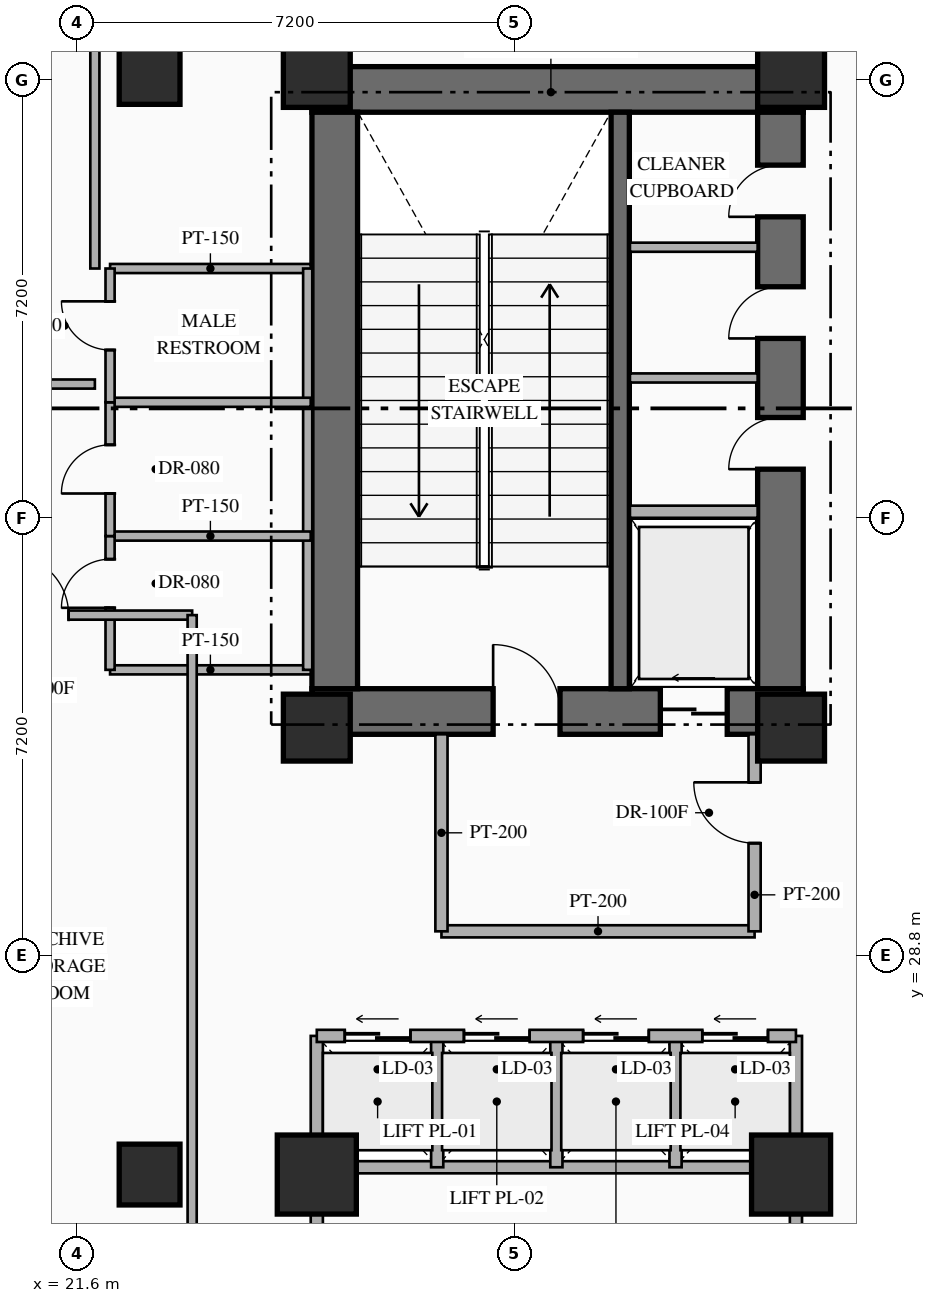
"""IFC4 building model, lengths in metres.
Left out: names, types, materials, properties, quantities, classifications, styles, units other than length and angle.
Written with IfcOpenShell. Run it as: python <this file> out.ifc"""

import sys

from ifc_helpers import new_model, si_unit, direction, frame, frame_2d, origin, origin_2d, place, context, subcontext, project, spatial, rectangle, hollow_rectangle, extrude, element, fill, save


model = new_model("IFC4")
c1 = context("Model", 3, precision=1e-05, world=origin(), true_north=direction((0.0, 1.0)))
c2 = subcontext(c1, "Body", "Model", "MODEL_VIEW")
j1 = project(units=[si_unit("LENGTHUNIT", "METRE"), si_unit("PLANEANGLEUNIT", "RADIAN")], contexts=[c1])
p1 = place(None, origin())
s1 = spatial("IfcSite", under=j1, at=p1, CompositionType="ELEMENT")
p2 = place(p1, origin())
s2 = spatial("IfcBuilding", under=s1, at=p2, CompositionType="ELEMENT")
p3 = place(p2, frame((0.0, 0.0, 10.8)))
s3 = spatial("IfcBuildingStorey", under=s2, at=p3, CompositionType="ELEMENT", Elevation=10.8)
p4 = place(p3, frame((25.47, 32.815, 0.0), z_axis=(0.0, 0.0, 1.0), x_axis=(1.0, 0.0, 0.0)))
e1 = element("IfcWall", 1, at=p4, inside=s3, PredefinedType="SHEAR", context=c2, shape_type="SweptSolid", body=[
    extrude(rectangle(XDim=8.08, YDim=0.75, at=frame_2d((4.04, 0.0))), origin(), (0.0, 0.0, 1.0), 5.4),
])
p5 = place(p4, frame((2.98, 0.0, 0.0)))
e2 = element("IfcOpeningElement", 2, at=p5, cuts=e1, PredefinedType="OPENING", context=c2, shape_type="SweptSolid", body=[
    extrude(rectangle(XDim=1.1, YDim=2.2, at=frame_2d((0.55, 1.1))), frame((0.0, 0.385, 0.0), z_axis=(0.0, -1.0, 0.0), x_axis=(1.0, 0.0, 0.0)), (0.0, 0.0, 1.0), 0.77),
])
p6 = place(p4, frame((5.73, 0.0, 0.0)))
e3 = element("IfcOpeningElement", 3, at=p6, cuts=e1, PredefinedType="OPENING", context=c2, shape_type="SweptSolid", body=[
    extrude(rectangle(XDim=1.1, YDim=2.15, at=frame_2d((0.55, 1.075))), frame((0.0, 0.385, 0.0), z_axis=(0.0, -1.0, 0.0), x_axis=(1.0, 0.0, 0.0)), (0.0, 0.0, 1.0), 0.77),
])
p7 = place(p3, frame((25.47, 43.045, 0.0), z_axis=(0.0, 0.0, 1.0), x_axis=(1.0, 0.0, 0.0)))
e4 = element("IfcWall", 4, at=p7, inside=s3, PredefinedType="SHEAR", context=c2, shape_type="SweptSolid", body=[
    extrude(rectangle(XDim=8.08, YDim=0.75, at=frame_2d((4.04, 0.0))), origin(), (0.0, 0.0, 1.0), 5.4),
])
p8 = place(p3, frame((25.845, 33.19, 0.0), z_axis=(0.0, 0.0, 1.0), x_axis=(0.0, 1.0, 0.0)))
e5 = element("IfcWall", 5, at=p8, inside=s3, PredefinedType="SHEAR", context=c2, shape_type="SweptSolid", body=[
    extrude(rectangle(XDim=9.48, YDim=0.75, at=frame_2d((4.74, 0.0))), origin(), (0.0, 0.0, 1.0), 5.4),
])
p9 = place(p3, frame((33.175, 33.19, 0.0), z_axis=(0.0, 0.0, 1.0), x_axis=(0.0, 1.0, 0.0)))
e6 = element("IfcWall", 6, at=p9, inside=s3, PredefinedType="SHEAR", context=c2, shape_type="SweptSolid", body=[
    extrude(rectangle(XDim=9.48, YDim=0.75, at=frame_2d((4.74, 0.0))), origin(), (0.0, 0.0, 1.0), 5.4),
])
p10 = place(p9, frame((3.61, 0.0, 0.0)))
e7 = element("IfcOpeningElement", 7, at=p10, cuts=e6, PredefinedType="OPENING", context=c2, shape_type="SweptSolid", body=[
    extrude(rectangle(XDim=0.85, YDim=2.08, at=frame_2d((0.425, 1.04))), frame((0.0, 0.385, 0.0), z_axis=(0.0, -1.0, 0.0), x_axis=(1.0, 0.0, 0.0)), (0.0, 0.0, 1.0), 0.77),
])
p11 = place(p9, frame((5.76, 0.0, 0.0)))
e8 = element("IfcOpeningElement", 8, at=p11, cuts=e6, PredefinedType="OPENING", context=c2, shape_type="SweptSolid", body=[
    extrude(rectangle(XDim=0.85, YDim=2.08, at=frame_2d((0.425, 1.04))), frame((0.0, 0.385, 0.0), z_axis=(0.0, -1.0, 0.0), x_axis=(1.0, 0.0, 0.0)), (0.0, 0.0, 1.0), 0.77),
])
p12 = place(p9, frame((7.76, 0.0, 0.0)))
e9 = element("IfcOpeningElement", 9, at=p12, cuts=e6, PredefinedType="OPENING", context=c2, shape_type="SweptSolid", body=[
    extrude(rectangle(XDim=0.85, YDim=2.08, at=frame_2d((0.425, 1.04))), frame((0.0, 0.385, 0.0), z_axis=(0.0, -1.0, 0.0), x_axis=(1.0, 0.0, 0.0)), (0.0, 0.0, 1.0), 0.77),
])
p13 = place(p3, frame((30.54, 33.19, 0.0), z_axis=(0.0, 0.0, 1.0), x_axis=(0.0, 1.0, 0.0)))
e10 = element("IfcWall", 10, at=p13, inside=s3, PredefinedType="SHEAR", context=c2, shape_type="SweptSolid", body=[
    extrude(rectangle(XDim=9.48, YDim=0.3, at=frame_2d((4.74, 0.0))), origin(), (0.0, 0.0, 1.0), 5.4),
])
for number, where, z_axis, x_axis in (
    (11, (25.55, 32.55, 0.0), (0.0, 0.0, 1.0), (1.0, 0.0, 0.0)),
    (12, (33.35, 32.55, 0.0), (0.0, 0.0, 1.0), (1.0, 0.0, 0.0)),
    (13, (25.55, 43.3, 0.0), (0.0, 0.0, 1.0), (1.0, 0.0, 0.0)),
    (14, (33.35, 43.3, 0.0), (0.0, 0.0, 1.0), (1.0, 0.0, 0.0)),
):
    element("IfcColumn", number, at=place(p3, frame(where, z_axis=z_axis, x_axis=x_axis)), inside=s3, PredefinedType="COLUMN", context=c2, shape_type="SweptSolid", body=[
        extrude(rectangle(XDim=1.1, YDim=1.1, at=origin_2d()), origin(), (0.0, 0.0, 1.0), 5.4),
    ])
for number, where, z_axis, x_axis in (
    (15, (25.55, 25.2, 0.0), (0.0, 0.0, 1.0), (1.0, 0.0, 0.0)),
    (16, (33.35, 25.2, 0.0), (0.0, 0.0, 1.0), (1.0, 0.0, 0.0)),
):
    element("IfcColumn", number, at=place(p3, frame(where, z_axis=z_axis, x_axis=x_axis)), inside=s3, PredefinedType="COLUMN", context=c2, shape_type="SweptSolid", body=[
        extrude(rectangle(XDim=1.3, YDim=1.3, at=origin_2d()), origin(), (0.0, 0.0, 1.0), 5.4),
    ])
for number, where, z_axis, x_axis in (
    (17, (22.8, 25.2, 0.0), (0.0, 0.0, 1.0), (1.0, 0.0, 0.0)),
    (18, (22.8, 43.3, 0.0), (0.0, 0.0, 1.0), (1.0, 0.0, 0.0)),
):
    element("IfcColumn", number, at=place(p3, frame(where, z_axis=z_axis, x_axis=x_axis)), inside=s3, PredefinedType="COLUMN", context=c2, shape_type="SweptSolid", body=[
        extrude(hollow_rectangle(XDim=1.0, YDim=1.0, WallThickness=0.038, at=origin_2d()), origin(), (0.0, 0.0, 1.0), 5.4),
    ])
p14 = place(p3, frame((30.7, 36.1, 0.0), z_axis=(0.0, 0.0, 1.0), x_axis=(1.0, 0.0, 0.0)))
e19 = element("IfcWall", 19, at=p14, inside=s3, PredefinedType="STANDARD", context=c2, shape_type="SweptSolid", body=[
    extrude(rectangle(XDim=2.1, YDim=0.2, at=frame_2d((1.05, 0.0))), origin(), (0.0, 0.0, 1.0), 5.1),
])
for number, where, z_axis, x_axis in (
    (20, (30.7, 38.3, 0.0), (0.0, 0.0, 1.0), (1.0, 0.0, 0.0)),
    (21, (30.7, 40.45, 0.0), (0.0, 0.0, 1.0), (1.0, 0.0, 0.0)),
):
    element("IfcWall", number, at=place(p3, frame(where, z_axis=z_axis, x_axis=x_axis)), inside=s3, PredefinedType="PARTITIONING", context=c2, shape_type="SweptSolid", body=[
        extrude(rectangle(XDim=2.1, YDim=0.15, at=frame_2d((1.05, 0.0))), origin(), (0.0, 0.0, 1.0), 5.1),
    ])
p15 = place(p3, frame((27.6, 29.2, 0.0), z_axis=(0.0, 0.0, 1.0), x_axis=(1.0, 0.0, 0.0)))
e22 = element("IfcWall", 22, at=p15, inside=s3, PredefinedType="STANDARD", context=c2, shape_type="SweptSolid", body=[
    extrude(rectangle(XDim=5.15, YDim=0.2, at=frame_2d((2.575, 0.0))), origin(), (0.0, 0.0, 1.0), 5.1),
])
p16 = place(p3, frame((27.6, 29.2, 0.0), z_axis=(0.0, 0.0, 1.0), x_axis=(0.0, 1.0, 0.0)))
e23 = element("IfcWall", 23, at=p16, inside=s3, PredefinedType="STANDARD", context=c2, shape_type="SweptSolid", body=[
    extrude(rectangle(XDim=3.24, YDim=0.2, at=frame_2d((1.62, 0.0))), origin(), (0.0, 0.0, 1.0), 5.1),
])
p17 = place(p3, frame((32.75, 29.2, 0.0), z_axis=(0.0, 0.0, 1.0), x_axis=(0.0, 1.0, 0.0)))
e24 = element("IfcWall", 24, at=p17, inside=s3, PredefinedType="STANDARD", context=c2, shape_type="SweptSolid", body=[
    extrude(rectangle(XDim=3.24, YDim=0.2, at=frame_2d((1.62, 0.0))), origin(), (0.0, 0.0, 1.0), 5.1),
])
p18 = place(p17, frame((1.45, 0.0, 0.0)))
e25 = element("IfcOpeningElement", 25, at=p18, cuts=e24, PredefinedType="OPENING", context=c2, shape_type="SweptSolid", body=[
    extrude(rectangle(XDim=1.0, YDim=2.2, at=frame_2d((0.5, 1.1))), frame((0.0, 0.11, 0.0), z_axis=(0.0, -1.0, 0.0), x_axis=(1.0, 0.0, 0.0)), (0.0, 0.0, 1.0), 0.22),
])
for number, where, z_axis, x_axis in (
    (26, (25.55, 23.4, 0.0), (0.0, 0.0, 1.0), (0.0, 1.0, 0.0)),
    (27, (33.43, 23.4, 0.0), (0.0, 0.0, 1.0), (0.0, 1.0, 0.0)),
):
    element("IfcWall", number, at=place(p3, frame(where, z_axis=z_axis, x_axis=x_axis)), inside=s3, PredefinedType="STANDARD", context=c2, shape_type="SweptSolid", body=[
        extrude(rectangle(XDim=4.08, YDim=0.2, at=frame_2d((2.04, 0.0))), origin(), (0.0, 0.0, 1.0), 3.895),
    ])
p19 = place(p3, frame((25.55, 25.32, 0.0), z_axis=(0.0, 0.0, 1.0), x_axis=(1.0, 0.0, 0.0)))
e28 = element("IfcWall", 28, at=p19, inside=s3, PredefinedType="STANDARD", context=c2, shape_type="SweptSolid", body=[
    extrude(rectangle(XDim=7.88, YDim=0.2, at=frame_2d((3.94, 0.0))), origin(), (0.0, 0.0, 1.0), 4.495),
])
for number, where, z_axis, x_axis in (
    (29, (27.53, 25.32, 0.0), (0.0, 0.0, 1.0), (0.0, 1.0, 0.0)),
    (30, (29.49, 25.32, 0.0), (0.0, 0.0, 1.0), (0.0, 1.0, 0.0)),
    (31, (31.45, 25.32, 0.0), (0.0, 0.0, 1.0), (0.0, 1.0, 0.0)),
):
    element("IfcWall", number, at=place(p3, frame(where, z_axis=z_axis, x_axis=x_axis)), inside=s3, PredefinedType="STANDARD", context=c2, shape_type="SweptSolid", body=[
        extrude(rectangle(XDim=2.16, YDim=0.2, at=frame_2d((1.08, 0.0))), origin(), (0.0, 0.0, 1.0), 5.1),
    ])
p20 = place(p3, frame((25.55, 27.48, 0.0), z_axis=(0.0, 0.0, 1.0), x_axis=(1.0, 0.0, 0.0)))
e32 = element("IfcWall", 32, at=p20, inside=s3, PredefinedType="STANDARD", context=c2, shape_type="SweptSolid", body=[
    extrude(rectangle(XDim=7.88, YDim=0.2, at=frame_2d((3.94, 0.0))), origin(), (0.0, 0.0, 1.0), 5.1),
])
p21 = place(p20, frame((0.46, 0.0, 0.0)))
e33 = element("IfcOpeningElement", 33, at=p21, cuts=e32, PredefinedType="OPENING", context=c2, shape_type="SweptSolid", body=[
    extrude(rectangle(XDim=1.08, YDim=2.15, at=frame_2d((0.54, 1.075))), frame((0.0, 0.11, 0.0), z_axis=(0.0, -1.0, 0.0), x_axis=(1.0, 0.0, 0.0)), (0.0, 0.0, 1.0), 0.22),
])
p22 = place(p20, frame((2.42, 0.0, 0.0)))
e34 = element("IfcOpeningElement", 34, at=p22, cuts=e32, PredefinedType="OPENING", context=c2, shape_type="SweptSolid", body=[
    extrude(rectangle(XDim=1.08, YDim=2.15, at=frame_2d((0.54, 1.075))), frame((0.0, 0.11, 0.0), z_axis=(0.0, -1.0, 0.0), x_axis=(1.0, 0.0, 0.0)), (0.0, 0.0, 1.0), 0.22),
])
p23 = place(p20, frame((4.38, 0.0, 0.0)))
e35 = element("IfcOpeningElement", 35, at=p23, cuts=e32, PredefinedType="OPENING", context=c2, shape_type="SweptSolid", body=[
    extrude(rectangle(XDim=1.08, YDim=2.15, at=frame_2d((0.54, 1.075))), frame((0.0, 0.11, 0.0), z_axis=(0.0, -1.0, 0.0), x_axis=(1.0, 0.0, 0.0)), (0.0, 0.0, 1.0), 0.22),
])
p24 = place(p20, frame((6.34, 0.0, 0.0)))
e36 = element("IfcOpeningElement", 36, at=p24, cuts=e32, PredefinedType="OPENING", context=c2, shape_type="SweptSolid", body=[
    extrude(rectangle(XDim=1.08, YDim=2.15, at=frame_2d((0.54, 1.075))), frame((0.0, 0.11, 0.0), z_axis=(0.0, -1.0, 0.0), x_axis=(1.0, 0.0, 0.0)), (0.0, 0.0, 1.0), 0.22),
])
for number, where, z_axis, x_axis in (
    (37, (22.15, 33.5, 0.0), (0.0, 0.0, 1.0), (1.0, 0.0, 0.0)),
    (38, (22.15, 40.1, 0.0), (0.0, 0.0, 1.0), (1.0, 0.0, 0.0)),
):
    element("IfcWall", number, at=place(p3, frame(where, z_axis=z_axis, x_axis=x_axis)), inside=s3, PredefinedType="PARTITIONING", context=c2, shape_type="SweptSolid", body=[
        extrude(rectangle(XDim=3.3, YDim=0.15, at=frame_2d((1.65, 0.0))), origin(), (0.0, 0.0, 1.0), 5.1),
    ])
p25 = place(p3, frame((25.4, 33.5, 0.0), z_axis=(0.0, 0.0, 1.0), x_axis=(0.0, 1.0, 0.0)))
e39 = element("IfcWall", 39, at=p25, inside=s3, PredefinedType="PARTITIONING", context=c2, shape_type="SweptSolid", body=[
    extrude(rectangle(XDim=6.6, YDim=0.15, at=frame_2d((3.3, 0.0))), origin(), (0.0, 0.0, 1.0), 5.1),
])
for number, where, z_axis, x_axis in (
    (40, (22.15, 35.7, 0.0), (0.0, 0.0, 1.0), (1.0, 0.0, 0.0)),
    (41, (22.15, 37.9, 0.0), (0.0, 0.0, 1.0), (1.0, 0.0, 0.0)),
):
    element("IfcWall", number, at=place(p3, frame(where, z_axis=z_axis, x_axis=x_axis)), inside=s3, PredefinedType="PARTITIONING", context=c2, shape_type="SweptSolid", body=[
        extrude(rectangle(XDim=3.3, YDim=0.15, at=frame_2d((1.65, 0.0))), origin(), (0.0, 0.0, 1.0), 5.1),
    ])
p26 = place(p3, frame((22.15, 33.5, 0.0), z_axis=(0.0, 0.0, 1.0), x_axis=(0.0, 1.0, 0.0)))
e42 = element("IfcWall", 42, at=p26, inside=s3, PredefinedType="PARTITIONING", context=c2, shape_type="SweptSolid", body=[
    extrude(rectangle(XDim=2.2, YDim=0.15, at=frame_2d((1.1, 0.0))), origin(), (0.0, 0.0, 1.0), 5.1),
])
p27 = place(p26, frame((1.02, 0.0, 0.0)))
e43 = element("IfcOpeningElement", 43, at=p27, cuts=e42, PredefinedType="OPENING", context=c2, shape_type="SweptSolid", body=[
    extrude(rectangle(XDim=0.8, YDim=2.06, at=frame_2d((0.4, 1.03))), frame((0.0, 0.085, 0.0), z_axis=(0.0, -1.0, 0.0), x_axis=(1.0, 0.0, 0.0)), (0.0, 0.0, 1.0), 0.17),
])
p28 = place(p3, frame((22.15, 35.7, 0.0), z_axis=(0.0, 0.0, 1.0), x_axis=(0.0, 1.0, 0.0)))
e44 = element("IfcWall", 44, at=p28, inside=s3, PredefinedType="PARTITIONING", context=c2, shape_type="SweptSolid", body=[
    extrude(rectangle(XDim=2.2, YDim=0.15, at=frame_2d((1.1, 0.0))), origin(), (0.0, 0.0, 1.0), 5.1),
])
p29 = place(p28, frame((0.7, 0.0, 0.0)))
e45 = element("IfcOpeningElement", 45, at=p29, cuts=e44, PredefinedType="OPENING", context=c2, shape_type="SweptSolid", body=[
    extrude(rectangle(XDim=0.8, YDim=2.06, at=frame_2d((0.4, 1.03))), frame((0.0, 0.085, 0.0), z_axis=(0.0, -1.0, 0.0), x_axis=(1.0, 0.0, 0.0)), (0.0, 0.0, 1.0), 0.17),
])
p30 = place(p3, frame((22.15, 37.9, 0.0), z_axis=(0.0, 0.0, 1.0), x_axis=(0.0, 1.0, 0.0)))
e46 = element("IfcWall", 46, at=p30, inside=s3, PredefinedType="PARTITIONING", context=c2, shape_type="SweptSolid", body=[
    extrude(rectangle(XDim=2.2, YDim=0.15, at=frame_2d((1.1, 0.0))), origin(), (0.0, 0.0, 1.0), 5.1),
])
p31 = place(p30, frame((0.86, 0.0, 0.0)))
e47 = element("IfcOpeningElement", 47, at=p31, cuts=e46, PredefinedType="OPENING", context=c2, shape_type="SweptSolid", body=[
    extrude(rectangle(XDim=0.8, YDim=2.06, at=frame_2d((0.4, 1.03))), frame((0.0, 0.085, 0.0), z_axis=(0.0, -1.0, 0.0), x_axis=(1.0, 0.0, 0.0)), (0.0, 0.0, 1.0), 0.17),
])
p32 = place(p3, frame((13.6, 38.2, 0.0), z_axis=(0.0, 0.0, 1.0), x_axis=(1.0, 0.0, 0.0)))
e48 = element("IfcWall", 48, at=p32, inside=s3, PredefinedType="PARTITIONING", context=c2, shape_type="SweptSolid", body=[
    extrude(rectangle(XDim=8.3, YDim=0.15, at=frame_2d((4.15, 0.0))), origin(), (0.0, 0.0, 1.0), 5.1),
])
p33 = place(p32, frame((3.65, 0.0, 0.0)))
e49 = element("IfcOpeningElement", 49, at=p33, cuts=e48, PredefinedType="OPENING", context=c2, shape_type="SweptSolid", body=[
    extrude(rectangle(XDim=1.0, YDim=2.15, at=frame_2d((0.5, 1.075))), frame((0.0, 0.085, 0.0), z_axis=(0.0, -1.0, 0.0), x_axis=(1.0, 0.0, 0.0)), (0.0, 0.0, 1.0), 0.17),
])
p34 = place(p3, frame((21.9, 40.1, 0.0), z_axis=(0.0, 0.0, 1.0), x_axis=(0.0, 1.0, 0.0)))
e50 = element("IfcWall", 50, at=p34, inside=s3, PredefinedType="PARTITIONING", context=c2, shape_type="SweptSolid", body=[
    extrude(rectangle(XDim=11.46, YDim=0.15, at=frame_2d((5.73, 0.0))), origin(), (0.0, 0.0, 1.0), 5.1),
])
p35 = place(p3, frame((19.2, 34.4, 0.0), z_axis=(0.0, 0.0, 1.0), x_axis=(1.0, 0.0, 0.0)))
e51 = element("IfcWall", 51, at=p35, inside=s3, PredefinedType="PARTITIONING", context=c2, shape_type="SweptSolid", body=[
    extrude(rectangle(XDim=4.3, YDim=0.15, at=frame_2d((2.15, 0.0))), origin(), (0.0, 0.0, 1.0), 5.1),
])
p36 = place(p35, frame((1.269, 0.0, 0.0)))
e52 = element("IfcOpeningElement", 52, at=p36, cuts=e51, PredefinedType="OPENING", context=c2, shape_type="SweptSolid", body=[
    extrude(rectangle(XDim=1.0, YDim=2.2, at=frame_2d((0.5, 1.1))), frame((0.0, 0.085, 0.0), z_axis=(0.0, -1.0, 0.0), x_axis=(1.0, 0.0, 0.0)), (0.0, 0.0, 1.0), 0.17),
])
p37 = place(p3, frame((23.5, 23.44, 0.0), z_axis=(0.0, 0.0, 1.0), x_axis=(0.0, 1.0, 0.0)))
e53 = element("IfcWall", 53, at=p37, inside=s3, PredefinedType="PARTITIONING", context=c2, shape_type="SweptSolid", body=[
    extrude(rectangle(XDim=10.96, YDim=0.15, at=frame_2d((5.48, 0.0))), origin(), (0.0, 0.0, 1.0), 5.1),
])
p38 = place(p3, frame((33.384, 17.312, 0.0), z_axis=(0.0, 0.0, 1.0), x_axis=(0.600008743659, 0.799993442181, 0.0)))
e54 = element("IfcWall", 54, at=p38, inside=s3, PredefinedType="PARTITIONING", context=c2, shape_type="SweptSolid", body=[
    extrude(rectangle(XDim=8.935, YDim=0.15, at=frame_2d((4.468, 0.0))), origin(), (0.0, 0.0, 1.0), 5.1),
])
p39 = place(p5, origin())
e55 = element("IfcDoor", 55, at=p39, inside=s3, OperationType="SINGLE_SWING_LEFT", PredefinedType="DOOR", context=c2, shape_type="SweptSolid", body=[
    extrude(rectangle(XDim=1.1, YDim=2.2, at=frame_2d((0.55, 1.1))), frame((0.0, 0.025, 0.0), z_axis=(0.0, -1.0, 0.0), x_axis=(1.0, 0.0, 0.0)), (0.0, 0.0, 1.0), 0.05),
])
fill(e2, e55)
p40 = place(p6, origin())
e56 = element("IfcDoor", 56, at=p40, inside=s3, OperationType="SLIDING_TO_LEFT", PredefinedType="USERDEFINED", context=c2, shape_type="SweptSolid", body=[
    extrude(rectangle(XDim=1.1, YDim=2.15, at=frame_2d((0.55, 1.075))), frame((0.0, 0.025, 0.0), z_axis=(0.0, -1.0, 0.0), x_axis=(1.0, 0.0, 0.0)), (0.0, 0.0, 1.0), 0.05),
])
fill(e3, e56)
p41 = place(p10, origin())
e57 = element("IfcDoor", 57, at=p41, inside=s3, OperationType="SINGLE_SWING_LEFT", PredefinedType="DOOR", context=c2, shape_type="SweptSolid", body=[
    extrude(rectangle(XDim=0.85, YDim=2.08, at=frame_2d((0.425, 1.04))), frame((0.0, 0.025, 0.0), z_axis=(0.0, -1.0, 0.0), x_axis=(1.0, 0.0, 0.0)), (0.0, 0.0, 1.0), 0.05),
])
fill(e7, e57)
p42 = place(p11, origin())
e58 = element("IfcDoor", 58, at=p42, inside=s3, OperationType="SINGLE_SWING_LEFT", PredefinedType="DOOR", context=c2, shape_type="SweptSolid", body=[
    extrude(rectangle(XDim=0.85, YDim=2.08, at=frame_2d((0.425, 1.04))), frame((0.0, 0.025, 0.0), z_axis=(0.0, -1.0, 0.0), x_axis=(1.0, 0.0, 0.0)), (0.0, 0.0, 1.0), 0.05),
])
fill(e8, e58)
p43 = place(p12, origin())
e59 = element("IfcDoor", 59, at=p43, inside=s3, OperationType="SINGLE_SWING_LEFT", PredefinedType="DOOR", context=c2, shape_type="SweptSolid", body=[
    extrude(rectangle(XDim=0.85, YDim=2.08, at=frame_2d((0.425, 1.04))), frame((0.0, 0.025, 0.0), z_axis=(0.0, -1.0, 0.0), x_axis=(1.0, 0.0, 0.0)), (0.0, 0.0, 1.0), 0.05),
])
fill(e9, e59)
p44 = place(p18, origin())
e60 = element("IfcDoor", 60, at=p44, inside=s3, OperationType="SINGLE_SWING_RIGHT", PredefinedType="DOOR", context=c2, shape_type="SweptSolid", body=[
    extrude(rectangle(XDim=1.0, YDim=2.2, at=frame_2d((0.5, 1.1))), frame((0.0, 0.025, 0.0), z_axis=(0.0, -1.0, 0.0), x_axis=(1.0, 0.0, 0.0)), (0.0, 0.0, 1.0), 0.05),
])
fill(e25, e60)
p45 = place(p21, origin())
e61 = element("IfcDoor", 61, at=p45, inside=s3, OperationType="SLIDING_TO_LEFT", PredefinedType="USERDEFINED", context=c2, shape_type="SweptSolid", body=[
    extrude(rectangle(XDim=1.08, YDim=2.15, at=frame_2d((0.54, 1.075))), frame((0.0, 0.025, 0.0), z_axis=(0.0, -1.0, 0.0), x_axis=(1.0, 0.0, 0.0)), (0.0, 0.0, 1.0), 0.05),
])
fill(e33, e61)
p46 = place(p22, origin())
e62 = element("IfcDoor", 62, at=p46, inside=s3, OperationType="SLIDING_TO_LEFT", PredefinedType="USERDEFINED", context=c2, shape_type="SweptSolid", body=[
    extrude(rectangle(XDim=1.08, YDim=2.15, at=frame_2d((0.54, 1.075))), frame((0.0, 0.025, 0.0), z_axis=(0.0, -1.0, 0.0), x_axis=(1.0, 0.0, 0.0)), (0.0, 0.0, 1.0), 0.05),
])
fill(e34, e62)
p47 = place(p23, origin())
e63 = element("IfcDoor", 63, at=p47, inside=s3, OperationType="SLIDING_TO_LEFT", PredefinedType="USERDEFINED", context=c2, shape_type="SweptSolid", body=[
    extrude(rectangle(XDim=1.08, YDim=2.15, at=frame_2d((0.54, 1.075))), frame((0.0, 0.025, 0.0), z_axis=(0.0, -1.0, 0.0), x_axis=(1.0, 0.0, 0.0)), (0.0, 0.0, 1.0), 0.05),
])
fill(e35, e63)
p48 = place(p24, origin())
e64 = element("IfcDoor", 64, at=p48, inside=s3, OperationType="SLIDING_TO_LEFT", PredefinedType="USERDEFINED", context=c2, shape_type="SweptSolid", body=[
    extrude(rectangle(XDim=1.08, YDim=2.15, at=frame_2d((0.54, 1.075))), frame((0.0, 0.025, 0.0), z_axis=(0.0, -1.0, 0.0), x_axis=(1.0, 0.0, 0.0)), (0.0, 0.0, 1.0), 0.05),
])
fill(e36, e64)
p49 = place(p27, origin())
e65 = element("IfcDoor", 65, at=p49, inside=s3, OperationType="SINGLE_SWING_LEFT", PredefinedType="DOOR", context=c2, shape_type="SweptSolid", body=[
    extrude(rectangle(XDim=0.8, YDim=2.06, at=frame_2d((0.4, 1.03))), frame((0.0, 0.025, 0.0), z_axis=(0.0, -1.0, 0.0), x_axis=(1.0, 0.0, 0.0)), (0.0, 0.0, 1.0), 0.05),
])
fill(e43, e65)
p50 = place(p29, origin())
e66 = element("IfcDoor", 66, at=p50, inside=s3, OperationType="SINGLE_SWING_LEFT", PredefinedType="DOOR", context=c2, shape_type="SweptSolid", body=[
    extrude(rectangle(XDim=0.8, YDim=2.06, at=frame_2d((0.4, 1.03))), frame((0.0, 0.025, 0.0), z_axis=(0.0, -1.0, 0.0), x_axis=(1.0, 0.0, 0.0)), (0.0, 0.0, 1.0), 0.05),
])
fill(e45, e66)
p51 = place(p31, origin())
e67 = element("IfcDoor", 67, at=p51, inside=s3, OperationType="SINGLE_SWING_RIGHT", PredefinedType="DOOR", context=c2, shape_type="SweptSolid", body=[
    extrude(rectangle(XDim=0.8, YDim=2.06, at=frame_2d((0.4, 1.03))), frame((0.0, 0.025, 0.0), z_axis=(0.0, -1.0, 0.0), x_axis=(1.0, 0.0, 0.0)), (0.0, 0.0, 1.0), 0.05),
])
fill(e47, e67)
p52 = place(p36, origin())
e68 = element("IfcDoor", 68, at=p52, inside=s3, OperationType="SINGLE_SWING_LEFT", PredefinedType="DOOR", context=c2, shape_type="SweptSolid", body=[
    extrude(rectangle(XDim=1.0, YDim=2.2, at=frame_2d((0.5, 1.1))), frame((0.0, 0.025, 0.0), z_axis=(0.0, -1.0, 0.0), x_axis=(1.0, 0.0, 0.0)), (0.0, 0.0, 1.0), 0.05),
])
fill(e52, e68)
save(model, sys.argv[1])
